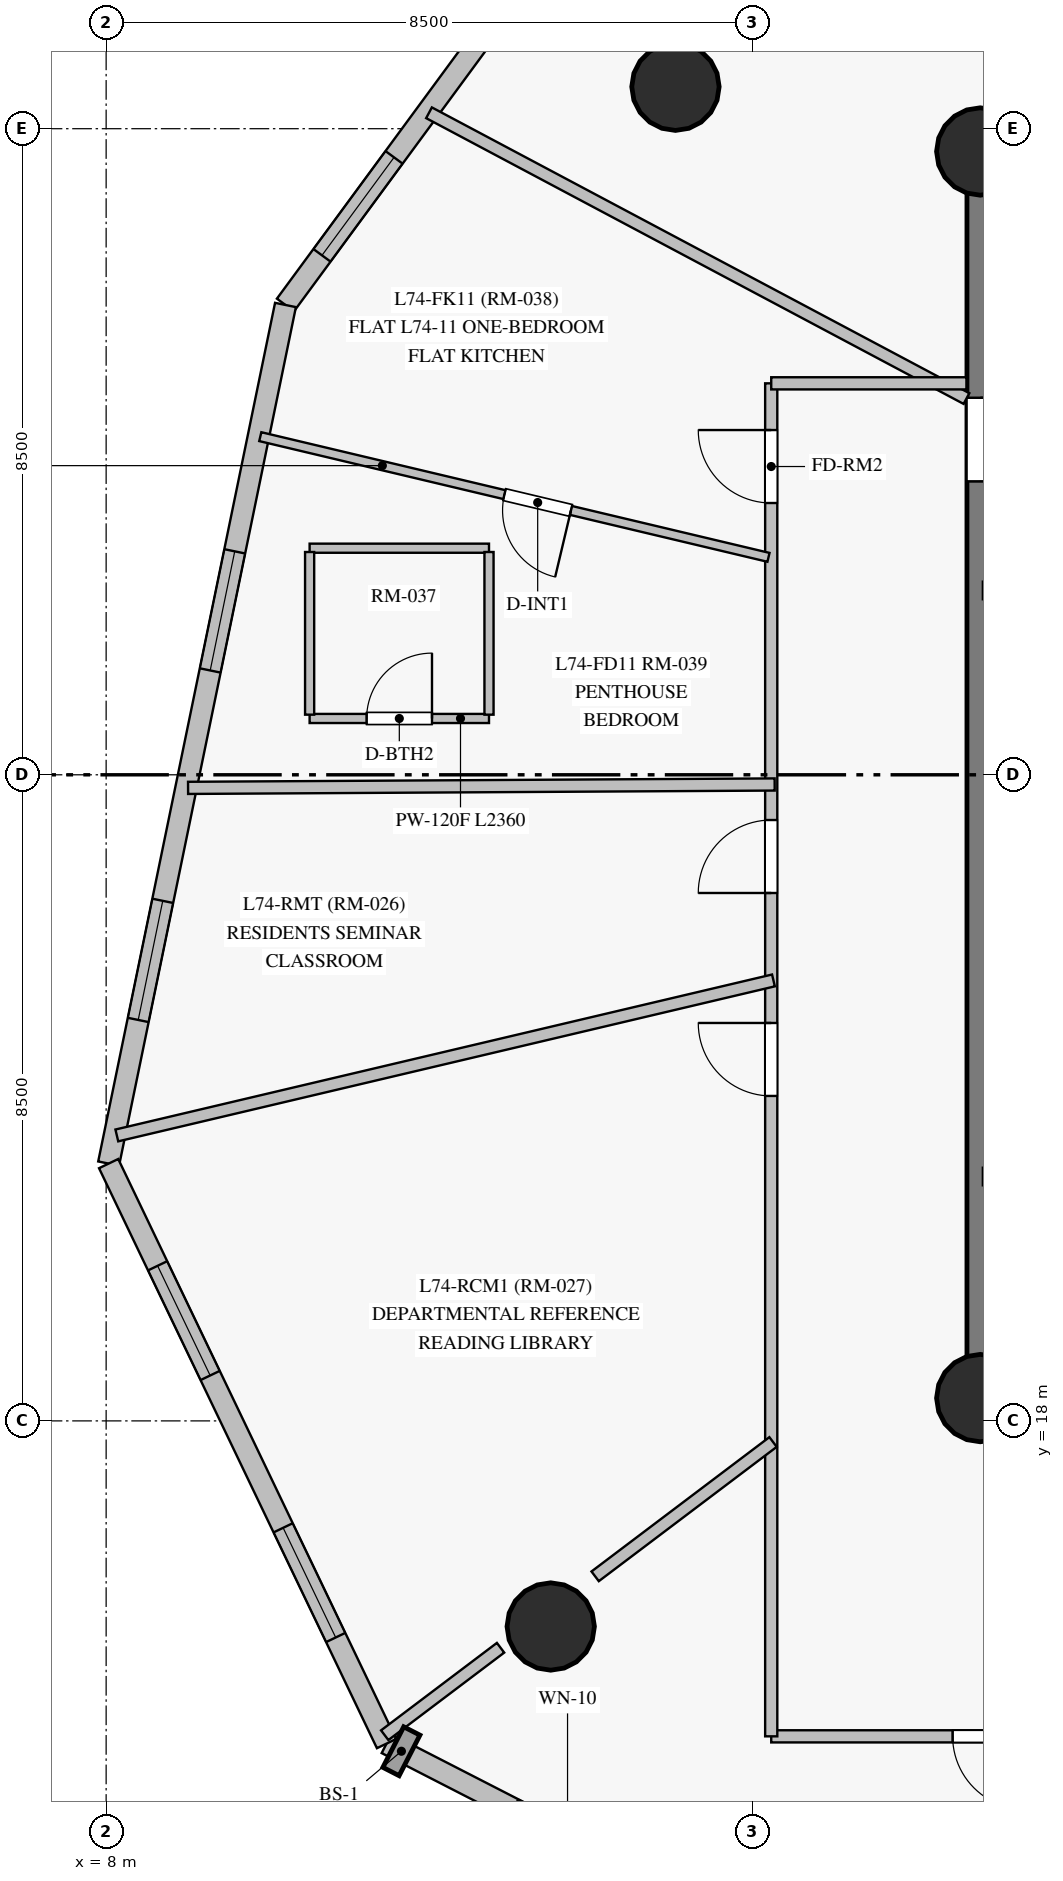
"""IFC4 building model, lengths in metres.
Left out: names, types, materials, properties, quantities, classifications, styles, units other than length and angle.
Written with IfcOpenShell. Run it as: python <this file> out.ifc"""

import sys

from ifc_helpers import new_model, si_unit, direction, frame, frame_2d, origin, origin_with_axes, origin_2d, place, context, subcontext, project, spatial, rectangle, circle, extrude, source, transform, mapped, element, fill, save


model = new_model("IFC4")
c1 = context("Model", 3, precision=1e-05, world=origin(), true_north=direction((0.0, 1.0)))
c2 = subcontext(c1, "Body", "Model", "MODEL_VIEW")
j1 = project(units=[si_unit("LENGTHUNIT", "METRE"), si_unit("PLANEANGLEUNIT", "RADIAN")], contexts=[c1])
p1 = place(None, origin())
s1 = spatial("IfcSite", under=j1, at=p1, CompositionType="ELEMENT")
p2 = place(p1, origin())
s2 = spatial("IfcBuilding", under=s1, at=p2, CompositionType="ELEMENT")
p3 = place(p2, frame((0.0, 0.0, 250.45)))
s3 = spatial("IfcBuildingStorey", under=s2, at=p3, CompositionType="ELEMENT", Elevation=250.45)
p4 = place(p3, frame((19.5, 18.3, 0.0), z_axis=(0.0, 0.0, 1.0), x_axis=(1.0, 0.0, 0.0)))
e1 = element("IfcWall", 1, at=p4, inside=s3, PredefinedType="SHEAR", context=c2, shape_type="SweptSolid", body=[
    extrude(rectangle(XDim=7.05, YDim=0.35, at=frame_2d((3.525, 0.0))), origin(), (0.0, 0.0, 1.0), 2.85),
])
p5 = place(p4, frame((4.2, 0.0, 0.0)))
e2 = element("IfcOpeningElement", 2, at=p5, cuts=e1, PredefinedType="OPENING", context=c2, shape_type="SweptSolid", body=[
    extrude(rectangle(XDim=1.4, YDim=2.2, at=frame_2d((0.7, 1.1))), frame((0.0, 0.185, 0.0), z_axis=(0.0, -1.0, 0.0), x_axis=(1.0, 0.0, 0.0)), (0.0, 0.0, 1.0), 0.37),
])
p6 = place(p3, frame((26.55, 34.7, 0.0), z_axis=(0.0, 0.0, 1.0), x_axis=(-1.0, 0.0, 0.0)))
e3 = element("IfcWall", 3, at=p6, inside=s3, PredefinedType="SHEAR", context=c2, shape_type="SweptSolid", body=[
    extrude(rectangle(XDim=7.05, YDim=0.35, at=frame_2d((3.525, 0.0))), origin(), (0.0, 0.0, 1.0), 2.85),
])
p7 = place(p3, frame((19.5, 34.7, 0.0), z_axis=(0.0, 0.0, 1.0), x_axis=(0.0, -1.0, 0.0)))
e4 = element("IfcWall", 4, at=p7, inside=s3, PredefinedType="SHEAR", context=c2, shape_type="SweptSolid", body=[
    extrude(rectangle(XDim=16.4, YDim=0.35, at=frame_2d((8.2, 0.0))), origin(), (0.0, 0.0, 1.0), 2.85),
])
p8 = place(p7, frame((3.24, 0.0, 0.0)))
e5 = element("IfcOpeningElement", 5, at=p8, cuts=e4, PredefinedType="OPENING", context=c2, shape_type="SweptSolid", body=[
    extrude(rectangle(XDim=1.1, YDim=2.15, at=frame_2d((0.55, 1.075))), frame((0.0, 0.185, 0.0), z_axis=(0.0, -1.0, 0.0), x_axis=(1.0, 0.0, 0.0)), (0.0, 0.0, 1.0), 0.37),
])
m1 = source(origin_with_axes(), c2, "Body", "SweptSolid", [
    extrude(circle(Radius=0.575, at=origin_2d()), origin(), (0.0, 0.0, 1.0), 3.05),
])
for number, where, z_axis, x_axis in (
    (6, (19.5, 18.3, 0.0), (0.0, 0.0, 1.0), (1.0, 0.0, 0.0)),
    (7, (19.5, 34.7, 0.0), (0.0, 0.0, 1.0), (1.0, 0.0, 0.0)),
    (8, (15.49, 35.552, 0.0), (0.0, 0.0, 1.0), (1.0, 0.0, 0.0)),
    (9, (13.849, 15.295, 0.0), (0.0, 0.0, 1.0), (1.0, 0.0, 0.0)),
):
    element("IfcColumn", number, at=place(p3, frame(where, z_axis=z_axis, x_axis=x_axis)), inside=s3, PredefinedType="COLUMN", context=c2, shape_type="MappedRepresentation", body=[
        mapped(m1, transform((0.0, 0.0, 0.0), scale=1.0)),
    ])
p9 = place(p3, frame((11.689, 13.754, 0.0), z_axis=(0.0, 0.0, 1.0), x_axis=(0.889712974327, -0.456520342716, 0.0)))
e10 = element("IfcWall", 10, at=p9, inside=s3, PredefinedType="SOLIDWALL", context=c2, shape_type="SweptSolid", body=[
    extrude(rectangle(XDim=11.533, YDim=0.28, at=frame_2d((5.767, 0.0))), origin(), (0.0, 0.0, 1.0), 2.85),
])
p10 = place(p9, frame((1.877, 0.0, 0.85)))
e11 = element("IfcOpeningElement", 11, at=p10, cuts=e10, PredefinedType="OPENING", context=c2, shape_type="SweptSolid", body=[
    extrude(rectangle(XDim=1.6, YDim=1.6, at=frame_2d((0.8, 0.8))), frame((0.0, 0.15, 0.0), z_axis=(0.0, -1.0, 0.0), x_axis=(1.0, 0.0, 0.0)), (0.0, 0.0, 1.0), 0.3),
])
p11 = place(p9, frame((6.47, 0.0, 0.85)))
e12 = element("IfcOpeningElement", 12, at=p11, cuts=e10, PredefinedType="OPENING", context=c2, shape_type="SweptSolid", body=[
    extrude(rectangle(XDim=1.6, YDim=1.6, at=frame_2d((0.8, 0.8))), frame((0.0, 0.15, 0.0), z_axis=(0.0, -1.0, 0.0), x_axis=(1.0, 0.0, 0.0)), (0.0, 0.0, 1.0), 0.3),
])
p12 = place(p3, frame((15.7, 39.941, 0.0), z_axis=(0.0, 0.0, 1.0), x_axis=(-0.592545574552, -0.805536927818, 0.0)))
e13 = element("IfcWall", 13, at=p12, inside=s3, PredefinedType="SOLIDWALL", context=c2, shape_type="SweptSolid", body=[
    extrude(rectangle(XDim=9.013, YDim=0.28, at=frame_2d((4.506, 0.0))), origin(), (0.0, 0.0, 1.0), 2.85),
])
p13 = place(p12, frame((2.156, 0.0, 0.85)))
e14 = element("IfcOpeningElement", 14, at=p13, cuts=e13, PredefinedType="OPENING", context=c2, shape_type="SweptSolid", body=[
    extrude(rectangle(XDim=1.6, YDim=1.6, at=frame_2d((0.8, 0.8))), frame((0.0, 0.15, 0.0), z_axis=(0.0, -1.0, 0.0), x_axis=(1.0, 0.0, 0.0)), (0.0, 0.0, 1.0), 0.3),
])
p14 = place(p12, frame((6.602, 0.0, 0.85)))
e15 = element("IfcOpeningElement", 15, at=p14, cuts=e13, PredefinedType="OPENING", context=c2, shape_type="SweptSolid", body=[
    extrude(rectangle(XDim=1.6, YDim=1.6, at=frame_2d((0.8, 0.8))), frame((0.0, 0.15, 0.0), z_axis=(0.0, -1.0, 0.0), x_axis=(1.0, 0.0, 0.0)), (0.0, 0.0, 1.0), 0.3),
])
p15 = place(p3, frame((10.359, 32.681, 0.0), z_axis=(0.0, 0.0, 1.0), x_axis=(-0.201738930334, -0.979439331448, 0.0)))
e16 = element("IfcWall", 16, at=p15, inside=s3, PredefinedType="SOLIDWALL", context=c2, shape_type="SweptSolid", body=[
    extrude(rectangle(XDim=11.533, YDim=0.28, at=frame_2d((5.767, 0.0))), origin(), (0.0, 0.0, 1.0), 2.85),
])
p16 = place(p15, frame((3.309, 0.0, 0.85)))
e17 = element("IfcOpeningElement", 17, at=p16, cuts=e16, PredefinedType="OPENING", context=c2, shape_type="SweptSolid", body=[
    extrude(rectangle(XDim=1.6, YDim=1.6, at=frame_2d((0.8, 0.8))), frame((0.0, 0.15, 0.0), z_axis=(0.0, -1.0, 0.0), x_axis=(1.0, 0.0, 0.0)), (0.0, 0.0, 1.0), 0.3),
])
p17 = place(p15, frame((8.004, 0.0, 0.85)))
e18 = element("IfcOpeningElement", 18, at=p17, cuts=e16, PredefinedType="OPENING", context=c2, shape_type="SweptSolid", body=[
    extrude(rectangle(XDim=1.6, YDim=1.6, at=frame_2d((0.8, 0.8))), frame((0.0, 0.15, 0.0), z_axis=(0.0, -1.0, 0.0), x_axis=(1.0, 0.0, 0.0)), (0.0, 0.0, 1.0), 0.3),
])
p18 = place(p3, frame((8.033, 21.385, 0.0), z_axis=(0.0, 0.0, 1.0), x_axis=(0.432111869591, -0.901820010955, 0.0)))
e19 = element("IfcWall", 19, at=p18, inside=s3, PredefinedType="SOLIDWALL", context=c2, shape_type="SweptSolid", body=[
    extrude(rectangle(XDim=8.461, YDim=0.28, at=frame_2d((4.231, 0.0))), origin(), (0.0, 0.0, 1.0), 2.85),
])
p19 = place(p18, frame((1.491, 0.0, 0.85)))
e20 = element("IfcOpeningElement", 20, at=p19, cuts=e19, PredefinedType="OPENING", context=c2, shape_type="SweptSolid", body=[
    extrude(rectangle(XDim=1.6, YDim=1.6, at=frame_2d((0.8, 0.8))), frame((0.0, 0.15, 0.0), z_axis=(0.0, -1.0, 0.0), x_axis=(1.0, 0.0, 0.0)), (0.0, 0.0, 1.0), 0.3),
])
p20 = place(p18, frame((5.313, 0.0, 0.85)))
e21 = element("IfcOpeningElement", 21, at=p20, cuts=e19, PredefinedType="OPENING", context=c2, shape_type="SweptSolid", body=[
    extrude(rectangle(XDim=1.6, YDim=1.6, at=frame_2d((0.8, 0.8))), frame((0.0, 0.15, 0.0), z_axis=(0.0, -1.0, 0.0), x_axis=(1.0, 0.0, 0.0)), (0.0, 0.0, 1.0), 0.3),
])
p21 = place(p3, frame((41.8, 13.85, 0.0), z_axis=(0.0, 0.0, 1.0), x_axis=(-1.0, 0.0, 0.0)))
e22 = element("IfcWall", 22, at=p21, inside=s3, PredefinedType="PARTITIONING", context=c2, shape_type="SweptSolid", body=[
    extrude(rectangle(XDim=25.05, YDim=0.16, at=frame_2d((12.525, 0.0))), origin(), (0.0, 0.0, 1.0), 2.3),
])
p22 = place(p21, frame((12.791, 0.0, 0.0)))
e23 = element("IfcOpeningElement", 23, at=p22, cuts=e22, PredefinedType="OPENING", context=c2, shape_type="SweptSolid", body=[
    extrude(rectangle(XDim=0.96, YDim=2.15, at=frame_2d((0.48, 1.075))), frame((0.0, 0.09, 0.0), z_axis=(0.0, -1.0, 0.0), x_axis=(1.0, 0.0, 0.0)), (0.0, 0.0, 1.0), 0.18),
])
p23 = place(p21, frame((21.704, 0.0, 0.0)))
e24 = element("IfcOpeningElement", 24, at=p23, cuts=e22, PredefinedType="OPENING", context=c2, shape_type="SweptSolid", body=[
    extrude(rectangle(XDim=0.96, YDim=2.15, at=frame_2d((0.48, 1.075))), frame((0.0, 0.09, 0.0), z_axis=(0.0, -1.0, 0.0), x_axis=(1.0, 0.0, 0.0)), (0.0, 0.0, 1.0), 0.18),
])
p24 = place(p21, frame((16.298, 0.0, 0.0)))
e25 = element("IfcOpeningElement", 25, at=p24, cuts=e22, PredefinedType="OPENING", context=c2, shape_type="SweptSolid", body=[
    extrude(rectangle(XDim=0.96, YDim=2.15, at=frame_2d((0.48, 1.075))), frame((0.0, 0.09, 0.0), z_axis=(0.0, -1.0, 0.0), x_axis=(1.0, 0.0, 0.0)), (0.0, 0.0, 1.0), 0.18),
])
p25 = place(p21, frame((8.292, 0.0, 0.0)))
e26 = element("IfcOpeningElement", 26, at=p25, cuts=e22, PredefinedType="OPENING", context=c2, shape_type="SweptSolid", body=[
    extrude(rectangle(XDim=0.96, YDim=2.15, at=frame_2d((0.48, 1.075))), frame((0.0, 0.09, 0.0), z_axis=(0.0, -1.0, 0.0), x_axis=(1.0, 0.0, 0.0)), (0.0, 0.0, 1.0), 0.18),
])
p26 = place(p3, frame((16.75, 13.85, 0.0), z_axis=(0.0, 0.0, 1.0), x_axis=(0.0, 1.0, 0.0)))
e27 = element("IfcWall", 27, at=p26, inside=s3, PredefinedType="PARTITIONING", context=c2, shape_type="SweptSolid", body=[
    extrude(rectangle(XDim=17.8, YDim=0.16, at=frame_2d((8.9, 0.0))), origin(), (0.0, 0.0, 1.0), 2.45),
])
p27 = place(p26, frame((16.226, 0.0, 0.0)))
e28 = element("IfcOpeningElement", 28, at=p27, cuts=e27, PredefinedType="OPENING", context=c2, shape_type="SweptSolid", body=[
    extrude(rectangle(XDim=0.96, YDim=2.15, at=frame_2d((0.48, 1.075))), frame((0.0, 0.09, 0.0), z_axis=(0.0, -1.0, 0.0), x_axis=(1.0, 0.0, 0.0)), (0.0, 0.0, 1.0), 0.18),
])
p28 = place(p26, frame((11.095, 0.0, 0.0)))
e29 = element("IfcOpeningElement", 29, at=p28, cuts=e27, PredefinedType="OPENING", context=c2, shape_type="SweptSolid", body=[
    extrude(rectangle(XDim=0.96, YDim=2.15, at=frame_2d((0.48, 1.075))), frame((0.0, 0.09, 0.0), z_axis=(0.0, -1.0, 0.0), x_axis=(1.0, 0.0, 0.0)), (0.0, 0.0, 1.0), 0.18),
])
p29 = place(p26, frame((8.425, 0.0, 0.0)))
e30 = element("IfcOpeningElement", 30, at=p29, cuts=e27, PredefinedType="OPENING", context=c2, shape_type="SweptSolid", body=[
    extrude(rectangle(XDim=0.96, YDim=2.15, at=frame_2d((0.48, 1.075))), frame((0.0, 0.09, 0.0), z_axis=(0.0, -1.0, 0.0), x_axis=(1.0, 0.0, 0.0)), (0.0, 0.0, 1.0), 0.18),
])
p30 = place(p3, frame((16.779, 23.795, 0.0), z_axis=(0.0, 0.0, 1.0), x_axis=(-0.973249169771, -0.229752156769, 0.0)))
e31 = element("IfcWall", 31, at=p30, inside=s3, PredefinedType="PARTITIONING", context=c2, shape_type="SweptSolid", body=[
    extrude(rectangle(XDim=8.876, YDim=0.16, at=frame_2d((4.438, 0.0))), origin(), (0.0, 0.0, 1.0), 2.85),
])
p31 = place(p3, frame((9.078, 26.328, 0.0), z_axis=(0.0, 0.0, 1.0), x_axis=(0.999983242382, 0.005789210166, 0.0)))
e32 = element("IfcWall", 32, at=p31, inside=s3, PredefinedType="PARTITIONING", context=c2, shape_type="SweptSolid", body=[
    extrude(rectangle(XDim=7.718, YDim=0.16, at=frame_2d((3.859, 0.0))), origin(), (0.0, 0.0, 1.0), 2.85),
])
p32 = place(p3, frame((19.319, 31.45, 0.0), z_axis=(0.0, 0.0, 1.0), x_axis=(-0.882939613172, 0.469486570087, 0.0)))
e33 = element("IfcWall", 33, at=p32, inside=s3, PredefinedType="PARTITIONING", context=c2, shape_type="SweptSolid", body=[
    extrude(rectangle(XDim=8.008, YDim=0.16, at=frame_2d((4.004, 0.0))), origin(), (0.0, 0.0, 1.0), 2.85),
])
p33 = place(p3, frame((16.714, 29.361, 0.0), z_axis=(0.0, 0.0, 1.0), x_axis=(-0.972944038436, 0.231040901295, 0.0)))
e34 = element("IfcWall", 34, at=p33, inside=s3, PredefinedType="PARTITIONING", context=c2, shape_type="SweptSolid", body=[
    extrude(rectangle(XDim=6.872, YDim=0.12, at=frame_2d((3.436, 0.0))), origin(), (0.0, 0.0, 1.0), 2.85),
])
p34 = place(p33, frame((2.671, 0.0, 0.0)))
e35 = element("IfcOpeningElement", 35, at=p34, cuts=e34, PredefinedType="OPENING", context=c2, shape_type="SweptSolid", body=[
    extrude(rectangle(XDim=0.9, YDim=2.1, at=frame_2d((0.45, 1.05))), frame((0.0, 0.07, 0.0), z_axis=(0.0, -1.0, 0.0), x_axis=(1.0, 0.0, 0.0)), (0.0, 0.0, 1.0), 0.14),
])
p35 = place(p3, frame((16.774, 17.722, 0.0), z_axis=(0.0, 0.0, 1.0), x_axis=(-0.798087936227, -0.602540991177, 0.0)))
e36 = element("IfcWall", 36, at=p35, inside=s3, PredefinedType="PARTITIONING", context=c2, shape_type="SweptSolid", body=[
    extrude(rectangle(XDim=2.933, YDim=0.16, at=frame_2d((1.466, 0.0))), origin(), (0.0, 0.0, 1.0), 2.35),
])
p36 = place(p3, frame((16.75, 31.65, 0.0), z_axis=(0.0, 0.0, 1.0), x_axis=(1.0, 0.0, 0.0)))
e37 = element("IfcWall", 37, at=p36, inside=s3, PredefinedType="PARTITIONING", context=c2, shape_type="SweptSolid", body=[
    extrude(rectangle(XDim=2.568, YDim=0.16, at=frame_2d((1.284, 0.0))), origin(), (0.0, 0.0, 1.0), 2.85),
])
p37 = place(p3, frame((10.677, 27.241, 0.0), z_axis=(0.0, 0.0, 1.0), x_axis=(1.0, 0.0, 0.0)))
e38 = element("IfcWall", 38, at=p37, inside=s3, PredefinedType="PARTITIONING", context=c2, shape_type="SweptSolid", body=[
    extrude(rectangle(XDim=2.36, YDim=0.12, at=frame_2d((1.18, 0.0))), origin(), (0.0, 0.0, 1.0), 2.85),
])
p38 = place(p37, frame((0.75, 0.0, 0.0)))
e39 = element("IfcOpeningElement", 39, at=p38, cuts=e38, PredefinedType="OPENING", context=c2, shape_type="SweptSolid", body=[
    extrude(rectangle(XDim=0.86, YDim=2.04, at=frame_2d((0.43, 1.02))), frame((0.0, 0.07, 0.0), z_axis=(0.0, -1.0, 0.0), x_axis=(1.0, 0.0, 0.0)), (0.0, 0.0, 1.0), 0.14),
])
p39 = place(p3, frame((13.037, 29.481, 0.0), z_axis=(0.0, 0.0, 1.0), x_axis=(-1.0, 0.0, 0.0)))
e40 = element("IfcWall", 40, at=p39, inside=s3, PredefinedType="PARTITIONING", context=c2, shape_type="SweptSolid", body=[
    extrude(rectangle(XDim=2.36, YDim=0.12, at=frame_2d((1.18, 0.0))), origin(), (0.0, 0.0, 1.0), 2.85),
])
for number, where, z_axis, x_axis in (
    (41, (13.037, 27.291, 0.0), (0.0, 0.0, 1.0), (0.0, 1.0, 0.0)),
    (42, (10.677, 29.431, 0.0), (0.0, 0.0, 1.0), (0.0, -1.0, 0.0)),
):
    element("IfcWall", number, at=place(p3, frame(where, z_axis=z_axis, x_axis=x_axis)), inside=s3, PredefinedType="PARTITIONING", context=c2, shape_type="SweptSolid", body=[
        extrude(rectangle(XDim=2.14, YDim=0.12, at=frame_2d((1.07, 0.0))), origin(), (0.0, 0.0, 1.0), 2.85),
    ])
p40 = place(p3, frame((13.189, 15.015, 0.0), z_axis=(0.0, 0.0, 1.0), x_axis=(-0.798124184404, -0.602492976116, 0.0)))
e43 = element("IfcWall", 43, at=p40, inside=s3, PredefinedType="PARTITIONING", context=c2, shape_type="SweptSolid", body=[
    extrude(rectangle(XDim=1.909, YDim=0.16, at=frame_2d((0.955, 0.0))), origin(), (0.0, 0.0, 1.0), 2.85),
])
m2 = source(origin_with_axes(), c2, "Body", "SweptSolid", [
    extrude(rectangle(XDim=1.6, YDim=1.6, at=frame_2d((0.8, 0.8))), frame((0.0, 0.03, 0.0), z_axis=(0.0, -1.0, 0.0), x_axis=(1.0, 0.0, 0.0)), (0.0, 0.0, 1.0), 0.06),
])
p41 = place(p14, origin())
e44 = element("IfcWindow", 44, at=p41, inside=s3, PartitioningType="SINGLE_PANEL", PredefinedType="WINDOW", context=c2, shape_type="MappedRepresentation", body=[
    mapped(m2, transform((0.0, 0.0, 0.0), scale=1.0)),
])
fill(e15, e44)
p42 = place(p16, origin())
e45 = element("IfcWindow", 45, at=p42, inside=s3, PartitioningType="SINGLE_PANEL", PredefinedType="WINDOW", context=c2, shape_type="MappedRepresentation", body=[
    mapped(m2, transform((0.0, 0.0, 0.0), scale=1.0)),
])
fill(e17, e45)
p43 = place(p17, origin())
e46 = element("IfcWindow", 46, at=p43, inside=s3, PartitioningType="SINGLE_PANEL", PredefinedType="WINDOW", context=c2, shape_type="MappedRepresentation", body=[
    mapped(m2, transform((0.0, 0.0, 0.0), scale=1.0)),
])
fill(e18, e46)
p44 = place(p19, origin())
e47 = element("IfcWindow", 47, at=p44, inside=s3, PartitioningType="SINGLE_PANEL", PredefinedType="WINDOW", context=c2, shape_type="MappedRepresentation", body=[
    mapped(m2, transform((0.0, 0.0, 0.0), scale=1.0)),
])
fill(e20, e47)
p45 = place(p20, origin())
e48 = element("IfcWindow", 48, at=p45, inside=s3, PartitioningType="SINGLE_PANEL", PredefinedType="WINDOW", context=c2, shape_type="MappedRepresentation", body=[
    mapped(m2, transform((0.0, 0.0, 0.0), scale=1.0)),
])
fill(e21, e48)
m3 = source(origin_with_axes(), c2, "Body", "SweptSolid", [
    extrude(rectangle(XDim=1.1, YDim=2.15, at=frame_2d((0.55, 1.075))), frame((0.0, 0.025, 0.0), z_axis=(0.0, -1.0, 0.0), x_axis=(1.0, 0.0, 0.0)), (0.0, 0.0, 1.0), 0.05),
])
p46 = place(p8, origin())
e49 = element("IfcDoor", 49, at=p46, inside=s3, OperationType="SINGLE_SWING_LEFT", PredefinedType="DOOR", context=c2, shape_type="MappedRepresentation", body=[
    mapped(m3, transform((0.0, 0.0, 0.0), scale=1.0)),
])
fill(e5, e49)
m4 = source(origin_with_axes(), c2, "Body", "SweptSolid", [
    extrude(rectangle(XDim=0.86, YDim=2.04, at=frame_2d((0.43, 1.02))), frame((0.0, 0.025, 0.0), z_axis=(0.0, -1.0, 0.0), x_axis=(1.0, 0.0, 0.0)), (0.0, 0.0, 1.0), 0.05),
])
p47 = place(p38, origin())
e50 = element("IfcDoor", 50, at=p47, inside=s3, OperationType="SINGLE_SWING_RIGHT", PredefinedType="DOOR", context=c2, shape_type="MappedRepresentation", body=[
    mapped(m4, transform((0.0, 0.0, 0.0), scale=1.0)),
])
fill(e39, e50)
m5 = source(origin_with_axes(), c2, "Body", "SweptSolid", [
    extrude(rectangle(XDim=0.9, YDim=2.1, at=frame_2d((0.45, 1.05))), frame((0.0, 0.025, 0.0), z_axis=(0.0, -1.0, 0.0), x_axis=(1.0, 0.0, 0.0)), (0.0, 0.0, 1.0), 0.05),
])
p48 = place(p34, origin())
e51 = element("IfcDoor", 51, at=p48, inside=s3, OperationType="SINGLE_SWING_LEFT", PredefinedType="DOOR", context=c2, shape_type="MappedRepresentation", body=[
    mapped(m5, transform((0.0, 0.0, 0.0), scale=1.0)),
])
fill(e35, e51)
m6 = source(origin_with_axes(), c2, "Body", "SweptSolid", [
    extrude(rectangle(XDim=0.96, YDim=2.15, at=frame_2d((0.48, 1.075))), frame((0.0, 0.025, 0.0), z_axis=(0.0, -1.0, 0.0), x_axis=(1.0, 0.0, 0.0)), (0.0, 0.0, 1.0), 0.05),
])
p49 = place(p27, origin())
e52 = element("IfcDoor", 52, at=p49, inside=s3, OperationType="SINGLE_SWING_RIGHT", PredefinedType="DOOR", context=c2, shape_type="MappedRepresentation", body=[
    mapped(m6, transform((0.0, 0.0, 0.0), scale=1.0)),
])
fill(e28, e52)
p50 = place(p28, origin())
e53 = element("IfcDoor", 53, at=p50, inside=s3, OperationType="SINGLE_SWING_LEFT", PredefinedType="DOOR", context=c2, shape_type="MappedRepresentation", body=[
    mapped(m6, transform((0.0, 0.0, 0.0), scale=1.0)),
])
fill(e29, e53)
p51 = place(p29, origin())
e54 = element("IfcDoor", 54, at=p51, inside=s3, OperationType="SINGLE_SWING_RIGHT", PredefinedType="DOOR", context=c2, shape_type="MappedRepresentation", body=[
    mapped(m6, transform((0.0, 0.0, 0.0), scale=1.0)),
])
fill(e30, e54)
p52 = place(p23, origin())
e55 = element("IfcDoor", 55, at=p52, inside=s3, OperationType="SINGLE_SWING_LEFT", PredefinedType="DOOR", context=c2, shape_type="MappedRepresentation", body=[
    mapped(m6, transform((0.0, 0.0, 0.0), scale=1.0)),
])
fill(e24, e55)
save(model, sys.argv[1])
